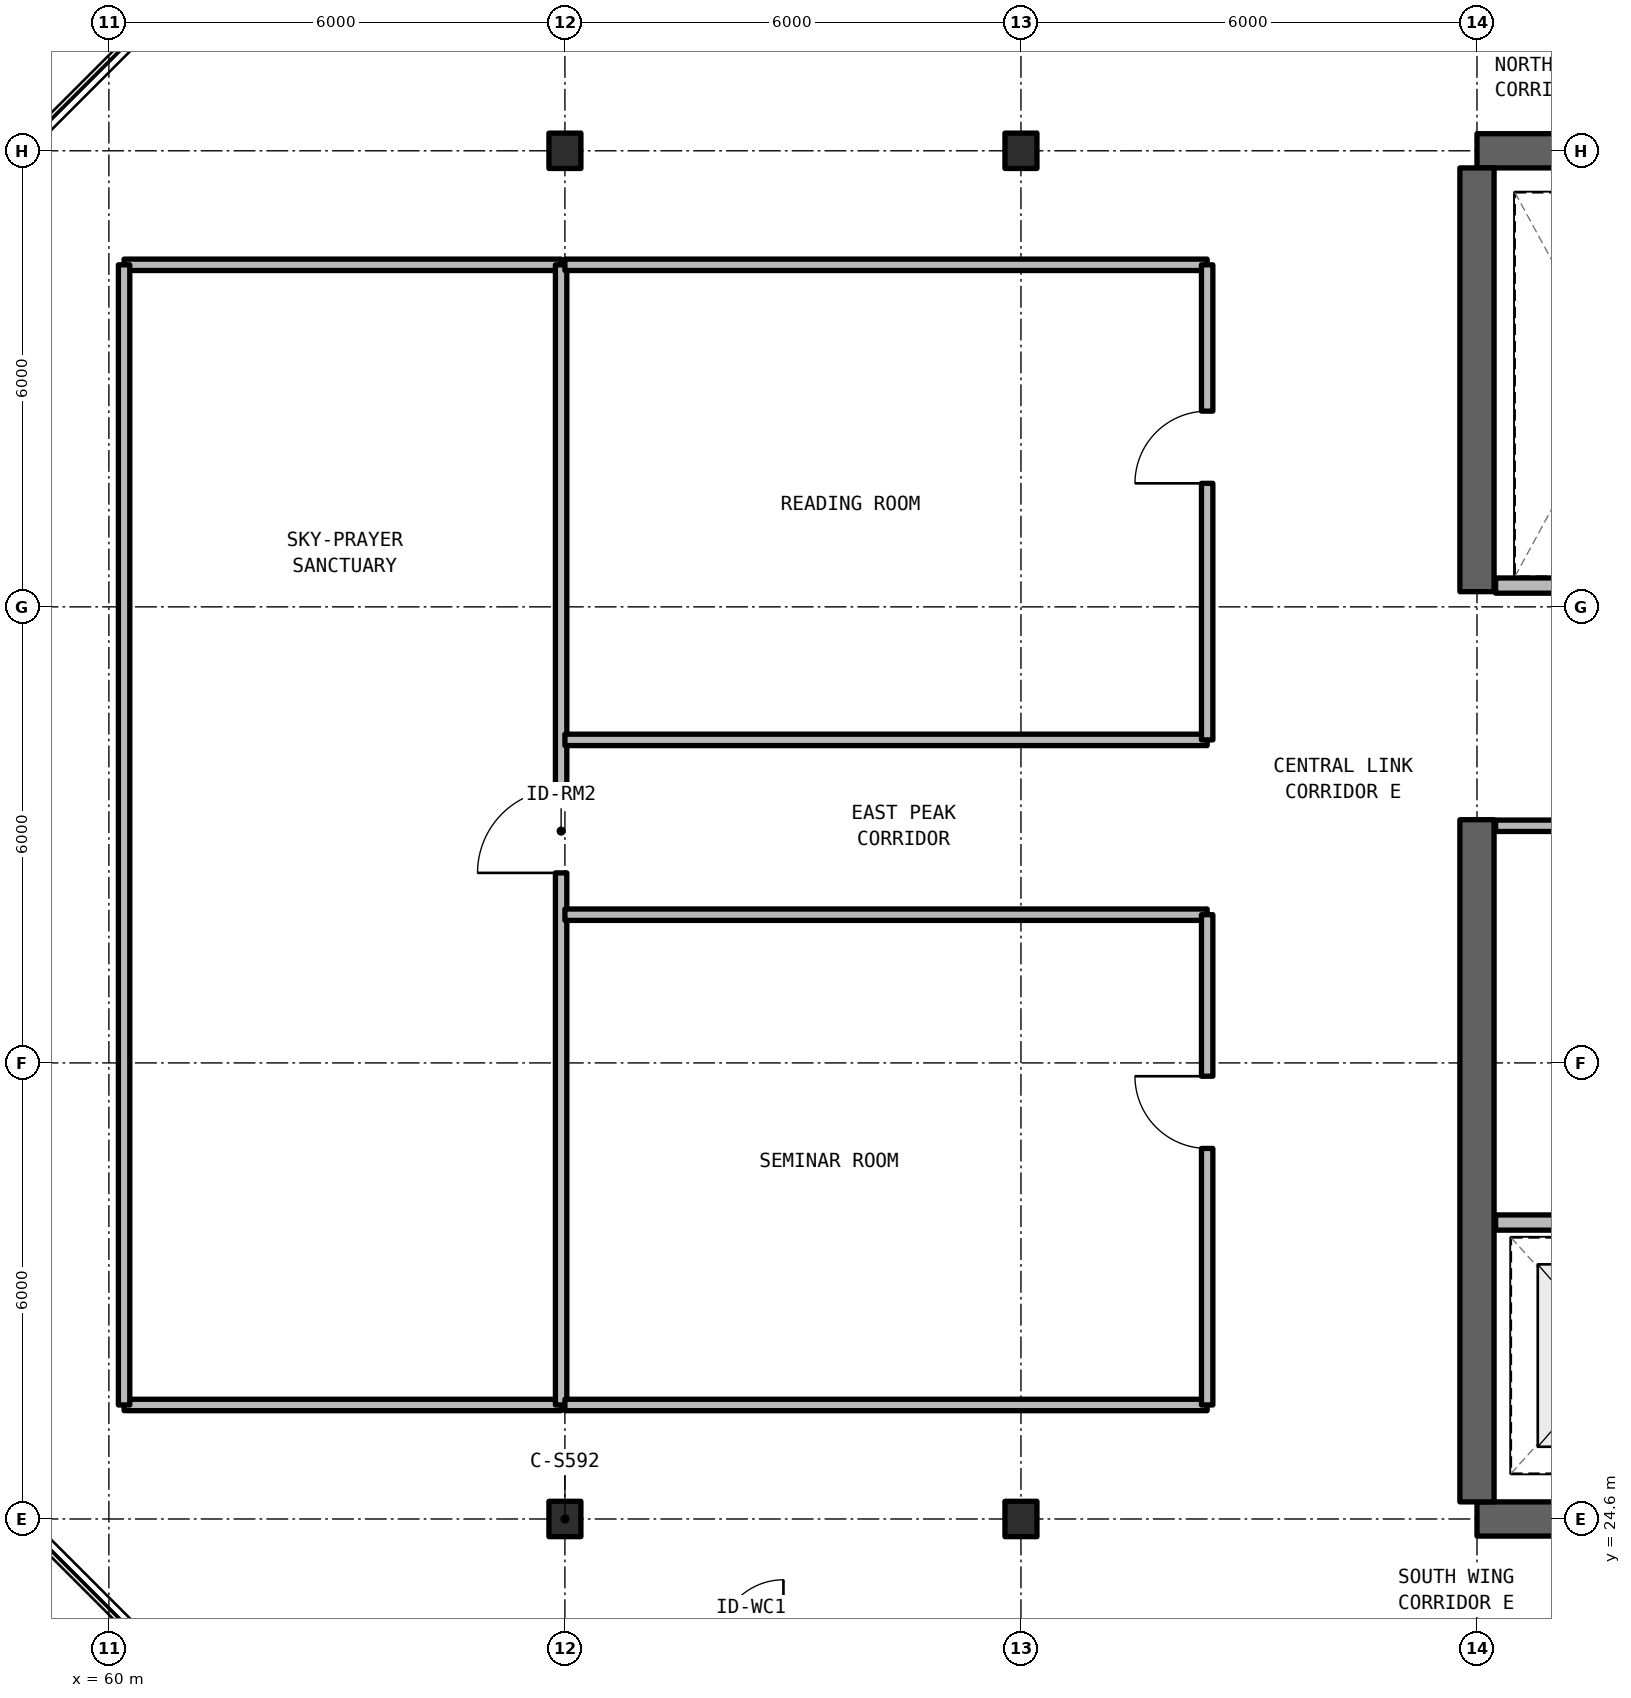
"""IFC4 building model, lengths in metres.
Left out: names, types, materials, properties, quantities, classifications, styles, units other than length and angle.
Written with IfcOpenShell. Run it as: python <this file> out.ifc"""

import sys

from ifc_helpers import new_model, si_unit, direction, frame, frame_2d, origin, origin_2d, place, context, subcontext, project, spatial, rectangle, i_section, extrude, element, fill, save


model = new_model("IFC4")
c1 = context("Model", 3, precision=1e-05, world=origin(), true_north=direction((0.0, 1.0)))
c2 = subcontext(c1, "Body", "Model", "MODEL_VIEW")
j1 = project(units=[si_unit("LENGTHUNIT", "METRE"), si_unit("PLANEANGLEUNIT", "RADIAN")], contexts=[c1])
p1 = place(None, origin())
s1 = spatial("IfcSite", under=j1, at=p1, CompositionType="ELEMENT")
p2 = place(p1, origin())
s2 = spatial("IfcBuilding", under=s1, at=p2, CompositionType="ELEMENT")
p3 = place(p2, frame((0.0, 0.0, 264.33)))
s3 = spatial("IfcBuildingStorey", under=s2, at=p3, CompositionType="ELEMENT", Elevation=264.33)
for number, where, z_axis, x_axis in (
    (1, (78.0, 24.6, 0.0), (0.0, 0.0, 1.0), (1.0, 0.0, 0.0)),
    (2, (90.0, 42.6, 0.0), (0.0, 0.0, 1.0), (-1.0, 0.0, 0.0)),
):
    element("IfcWall", number, at=place(p3, frame(where, z_axis=z_axis, x_axis=x_axis)), inside=s3, PredefinedType="SHEAR", context=c2, shape_type="SweptSolid", body=[
        extrude(rectangle(XDim=12.0, YDim=0.45, at=frame_2d((6.0, 0.0))), origin(), (0.0, 0.0, 1.0), 3.63),
    ])
p4 = place(p3, frame((78.0, 24.825, 0.0), z_axis=(0.0, 0.0, 1.0), x_axis=(0.0, 1.0, 0.0)))
e3 = element("IfcWall", 3, at=p4, inside=s3, PredefinedType="SHEAR", context=c2, shape_type="SweptSolid", body=[
    extrude(rectangle(XDim=8.975, YDim=0.45, at=frame_2d((4.488, 0.0))), origin(), (0.0, 0.0, 1.0), 3.63),
])
p5 = place(p3, frame((78.0, 36.8, 0.0), z_axis=(0.0, 0.0, 1.0), x_axis=(0.0, 1.0, 0.0)))
e4 = element("IfcWall", 4, at=p5, inside=s3, PredefinedType="SHEAR", context=c2, shape_type="SweptSolid", body=[
    extrude(rectangle(XDim=5.575, YDim=0.45, at=frame_2d((2.788, 0.0))), origin(), (0.0, 0.0, 1.0), 3.63),
])
for number, where, z_axis, x_axis in (
    (5, (66.0, 24.6, 0.0), (0.0, 0.0, 1.0), (1.0, 0.0, 0.0)),
    (6, (66.0, 42.6, 0.0), (0.0, 0.0, 1.0), (1.0, 0.0, 0.0)),
    (7, (72.0, 24.6, 0.0), (0.0, 0.0, 1.0), (1.0, 0.0, 0.0)),
    (8, (72.0, 42.6, 0.0), (0.0, 0.0, 1.0), (1.0, 0.0, 0.0)),
):
    element("IfcColumn", number, at=place(p3, frame(where, z_axis=z_axis, x_axis=x_axis)), inside=s3, PredefinedType="COLUMN", context=c2, shape_type="SweptSolid", body=[
        extrude(i_section(OverallWidth=0.421, OverallDepth=0.465, WebThickness=0.045, FlangeThickness=0.07, FilletRadius=0.015, at=origin_2d()), origin(), (0.0, 0.0, 1.0), 3.63),
    ])
p6 = place(p3, frame((78.245, 28.5, 0.0), z_axis=(0.0, 0.0, 1.0), x_axis=(1.0, 0.0, 0.0)))
e9 = element("IfcWall", 9, at=p6, inside=s3, PredefinedType="SOLIDWALL", context=c2, shape_type="SweptSolid", body=[
    extrude(rectangle(XDim=7.585, YDim=0.2, at=frame_2d((3.792, 0.0))), origin(), (0.0, 0.0, 1.0), 2.63),
])
p7 = place(p6, frame((3.555, 0.0, 0.0)))
e10 = element("IfcOpeningElement", 10, at=p7, cuts=e9, PredefinedType="OPENING", context=c2, shape_type="SweptSolid", body=[
    extrude(rectangle(XDim=1.0, YDim=2.15, at=frame_2d((0.5, 1.075))), frame((0.0, 0.11, 0.0), z_axis=(0.0, -1.0, 0.0), x_axis=(1.0, 0.0, 0.0)), (0.0, 0.0, 1.0), 0.22),
])
p8 = place(p3, frame((78.245, 33.72, 0.0), z_axis=(0.0, 0.0, 1.0), x_axis=(1.0, 0.0, 0.0)))
e11 = element("IfcWall", 11, at=p8, inside=s3, PredefinedType="SOLIDWALL", context=c2, shape_type="SweptSolid", body=[
    extrude(rectangle(XDim=3.075, YDim=0.15, at=frame_2d((1.538, 0.0))), origin(), (0.0, 0.0, 1.0), 2.63),
])
p9 = place(p3, frame((78.245, 36.88, 0.0), z_axis=(0.0, 0.0, 1.0), x_axis=(1.0, 0.0, 0.0)))
e12 = element("IfcWall", 12, at=p9, inside=s3, PredefinedType="SOLIDWALL", context=c2, shape_type="SweptSolid", body=[
    extrude(rectangle(XDim=3.075, YDim=0.2, at=frame_2d((1.538, 0.0))), origin(), (0.0, 0.0, 1.0), 2.63),
])
for number, where, z_axis, x_axis in (
    (13, (60.2, 26.1, 0.0), (0.0, 0.0, 1.0), (1.0, 0.0, 0.0)),
    (14, (60.2, 41.1, 0.0), (0.0, 0.0, 1.0), (1.0, 0.0, 0.0)),
):
    element("IfcWall", number, at=place(p3, frame(where, z_axis=z_axis, x_axis=x_axis)), inside=s3, PredefinedType="SOLIDWALL", context=c2, shape_type="SweptSolid", body=[
        extrude(rectangle(XDim=5.75, YDim=0.15, at=frame_2d((2.875, 0.0))), origin(), (0.0, 0.0, 1.0), 2.63),
    ])
p10 = place(p3, frame((60.2, 26.1, 0.0), z_axis=(0.0, 0.0, 1.0), x_axis=(0.0, 1.0, 0.0)))
e15 = element("IfcWall", 15, at=p10, inside=s3, PredefinedType="SOLIDWALL", context=c2, shape_type="SweptSolid", body=[
    extrude(rectangle(XDim=15.0, YDim=0.15, at=frame_2d((7.5, 0.0))), origin(), (0.0, 0.0, 1.0), 2.63),
])
p11 = place(p3, frame((65.95, 26.1, 0.0), z_axis=(0.0, 0.0, 1.0), x_axis=(0.0, 1.0, 0.0)))
e16 = element("IfcWall", 16, at=p11, inside=s3, PredefinedType="SOLIDWALL", context=c2, shape_type="SweptSolid", body=[
    extrude(rectangle(XDim=15.0, YDim=0.15, at=frame_2d((7.5, 0.0))), origin(), (0.0, 0.0, 1.0), 2.63),
])
p12 = place(p11, frame((7.0, 0.0, 0.0)))
e17 = element("IfcOpeningElement", 17, at=p12, cuts=e16, PredefinedType="OPENING", context=c2, shape_type="SweptSolid", body=[
    extrude(rectangle(XDim=1.1, YDim=2.15, at=frame_2d((0.55, 1.075))), frame((0.0, 0.085, 0.0), z_axis=(0.0, -1.0, 0.0), x_axis=(1.0, 0.0, 0.0)), (0.0, 0.0, 1.0), 0.17),
])
for number, where, z_axis, x_axis in (
    (18, (66.0, 26.1, 0.0), (0.0, 0.0, 1.0), (1.0, 0.0, 0.0)),
    (19, (66.0, 32.55, 0.0), (0.0, 0.0, 1.0), (1.0, 0.0, 0.0)),
):
    element("IfcWall", number, at=place(p3, frame(where, z_axis=z_axis, x_axis=x_axis)), inside=s3, PredefinedType="SOLIDWALL", context=c2, shape_type="SweptSolid", body=[
        extrude(rectangle(XDim=8.45, YDim=0.15, at=frame_2d((4.225, 0.0))), origin(), (0.0, 0.0, 1.0), 2.63),
    ])
p13 = place(p3, frame((74.45, 26.1, 0.0), z_axis=(0.0, 0.0, 1.0), x_axis=(0.0, 1.0, 0.0)))
e20 = element("IfcWall", 20, at=p13, inside=s3, PredefinedType="SOLIDWALL", context=c2, shape_type="SweptSolid", body=[
    extrude(rectangle(XDim=6.45, YDim=0.15, at=frame_2d((3.225, 0.0))), origin(), (0.0, 0.0, 1.0), 2.63),
])
p14 = place(p13, frame((3.375, 0.0, 0.0)))
e21 = element("IfcOpeningElement", 21, at=p14, cuts=e20, PredefinedType="OPENING", context=c2, shape_type="SweptSolid", body=[
    extrude(rectangle(XDim=0.95, YDim=2.15, at=frame_2d((0.475, 1.075))), frame((0.0, 0.085, 0.0), z_axis=(0.0, -1.0, 0.0), x_axis=(1.0, 0.0, 0.0)), (0.0, 0.0, 1.0), 0.17),
])
for number, where, z_axis, x_axis in (
    (22, (66.0, 34.85, 0.0), (0.0, 0.0, 1.0), (1.0, 0.0, 0.0)),
    (23, (66.0, 41.1, 0.0), (0.0, 0.0, 1.0), (1.0, 0.0, 0.0)),
):
    element("IfcWall", number, at=place(p3, frame(where, z_axis=z_axis, x_axis=x_axis)), inside=s3, PredefinedType="SOLIDWALL", context=c2, shape_type="SweptSolid", body=[
        extrude(rectangle(XDim=8.45, YDim=0.15, at=frame_2d((4.225, 0.0))), origin(), (0.0, 0.0, 1.0), 2.63),
    ])
p15 = place(p3, frame((74.45, 34.85, 0.0), z_axis=(0.0, 0.0, 1.0), x_axis=(0.0, 1.0, 0.0)))
e24 = element("IfcWall", 24, at=p15, inside=s3, PredefinedType="SOLIDWALL", context=c2, shape_type="SweptSolid", body=[
    extrude(rectangle(XDim=6.25, YDim=0.15, at=frame_2d((3.125, 0.0))), origin(), (0.0, 0.0, 1.0), 2.63),
])
p16 = place(p15, frame((3.375, 0.0, 0.0)))
e25 = element("IfcOpeningElement", 25, at=p16, cuts=e24, PredefinedType="OPENING", context=c2, shape_type="SweptSolid", body=[
    extrude(rectangle(XDim=0.95, YDim=2.15, at=frame_2d((0.475, 1.075))), frame((0.0, 0.085, 0.0), z_axis=(0.0, -1.0, 0.0), x_axis=(1.0, 0.0, 0.0)), (0.0, 0.0, 1.0), 0.17),
])
p17 = place(p12, origin())
e26 = element("IfcDoor", 26, at=p17, inside=s3, OperationType="SINGLE_SWING_LEFT", PredefinedType="DOOR", context=c2, shape_type="SweptSolid", body=[
    extrude(rectangle(XDim=1.1, YDim=2.15, at=frame_2d((0.55, 1.075))), frame((0.0, 0.025, 0.0), z_axis=(0.0, -1.0, 0.0), x_axis=(1.0, 0.0, 0.0)), (0.0, 0.0, 1.0), 0.05),
])
fill(e17, e26)
p18 = place(p14, origin())
e27 = element("IfcDoor", 27, at=p18, inside=s3, OperationType="SINGLE_SWING_RIGHT", PredefinedType="DOOR", context=c2, shape_type="SweptSolid", body=[
    extrude(rectangle(XDim=0.95, YDim=2.15, at=frame_2d((0.475, 1.075))), frame((0.0, 0.025, 0.0), z_axis=(0.0, -1.0, 0.0), x_axis=(1.0, 0.0, 0.0)), (0.0, 0.0, 1.0), 0.05),
])
fill(e21, e27)
p19 = place(p16, origin())
e28 = element("IfcDoor", 28, at=p19, inside=s3, OperationType="SINGLE_SWING_LEFT", PredefinedType="DOOR", context=c2, shape_type="SweptSolid", body=[
    extrude(rectangle(XDim=0.95, YDim=2.15, at=frame_2d((0.475, 1.075))), frame((0.0, 0.025, 0.0), z_axis=(0.0, -1.0, 0.0), x_axis=(1.0, 0.0, 0.0)), (0.0, 0.0, 1.0), 0.05),
])
fill(e25, e28)
save(model, sys.argv[1])
